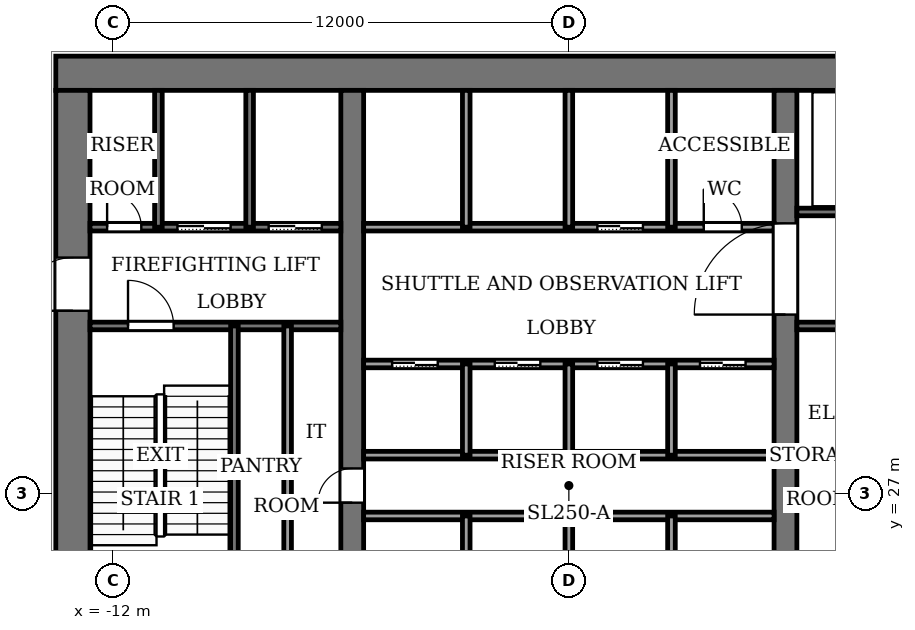
"""IFC4 building model, lengths in metres.
Left out: names, types, materials, properties, quantities, classifications, styles, units other than length and angle.
Written with IfcOpenShell. Run it as: python <this file> out.ifc"""

import sys

from ifc_helpers import new_model, si_unit, direction, frame, frame_2d, origin, place, context, subcontext, project, spatial, rectangle, extrude, element, fill, save


model = new_model("IFC4")
c1 = context("Model", 3, precision=1e-05, world=origin(), true_north=direction((0.0, 1.0)))
c2 = subcontext(c1, "Body", "Model", "MODEL_VIEW")
j1 = project(units=[si_unit("LENGTHUNIT", "METRE"), si_unit("PLANEANGLEUNIT", "RADIAN")], contexts=[c1])
p1 = place(None, origin())
s1 = spatial("IfcSite", under=j1, at=p1, CompositionType="ELEMENT")
p2 = place(p1, origin())
s2 = spatial("IfcBuilding", under=s1, at=p2, CompositionType="ELEMENT")
p3 = place(p2, frame((0.0, 0.0, 177.0)))
s3 = spatial("IfcBuildingStorey", under=s2, at=p3, CompositionType="ELEMENT", Elevation=177.0)
p4 = place(p3, frame((-13.5, 38.05, -0.13), z_axis=(0.0, 0.0, 1.0), x_axis=(1.0, 0.0, 0.0)))
e1 = element("IfcWall", 1, at=p4, inside=s3, PredefinedType="SHEAR", context=c2, shape_type="SweptSolid", body=[
    extrude(rectangle(XDim=27.0, YDim=0.9, at=frame_2d((13.5, 0.0))), origin(), (0.0, 0.0, 1.0), 5.0),
])
p5 = place(p3, frame((-13.05, 18.4, -0.13), z_axis=(0.0, 0.0, 1.0), x_axis=(0.0, 1.0, 0.0)))
e2 = element("IfcWall", 2, at=p5, inside=s3, PredefinedType="SHEAR", context=c2, shape_type="SweptSolid", body=[
    extrude(rectangle(XDim=19.2, YDim=0.9, at=frame_2d((9.6, 0.0))), origin(), (0.0, 0.0, 1.0), 5.0),
])
p6 = place(p5, frame((2.8, 0.0, 0.13)))
e3 = element("IfcOpeningElement", 3, at=p6, cuts=e2, PredefinedType="OPENING", context=c2, shape_type="SweptSolid", body=[
    extrude(rectangle(XDim=2.4, YDim=2.4, at=frame_2d((1.2, 1.2))), frame((0.0, 0.46, 0.0), z_axis=(0.0, -1.0, 0.0), x_axis=(1.0, 0.0, 0.0)), (0.0, 0.0, 1.0), 0.92),
])
p7 = place(p5, frame((13.4, 0.0, 0.13)))
e4 = element("IfcOpeningElement", 4, at=p7, cuts=e2, PredefinedType="OPENING", context=c2, shape_type="SweptSolid", body=[
    extrude(rectangle(XDim=1.4, YDim=2.2, at=frame_2d((0.7, 1.1))), frame((0.0, 0.46, 0.0), z_axis=(0.0, -1.0, 0.0), x_axis=(1.0, 0.0, 0.0)), (0.0, 0.0, 1.0), 0.92),
])
p8 = place(p3, frame((-5.7, 18.4, -0.13), z_axis=(0.0, 0.0, 1.0), x_axis=(0.0, 1.0, 0.0)))
e5 = element("IfcWall", 5, at=p8, inside=s3, PredefinedType="SHEAR", context=c2, shape_type="SweptSolid", body=[
    extrude(rectangle(XDim=19.2, YDim=0.6, at=frame_2d((9.6, 0.0))), origin(), (0.0, 0.0, 1.0), 5.0),
])
p9 = place(p8, frame((8.35, 0.0, 0.13)))
e6 = element("IfcOpeningElement", 6, at=p9, cuts=e5, PredefinedType="OPENING", context=c2, shape_type="SweptSolid", body=[
    extrude(rectangle(XDim=0.9, YDim=2.1, at=frame_2d((0.45, 1.05))), frame((0.0, 0.31, 0.0), z_axis=(0.0, -1.0, 0.0), x_axis=(1.0, 0.0, 0.0)), (0.0, 0.0, 1.0), 0.62),
])
p10 = place(p3, frame((5.7, 18.4, -0.13), z_axis=(0.0, 0.0, 1.0), x_axis=(0.0, 1.0, 0.0)))
e7 = element("IfcWall", 7, at=p10, inside=s3, PredefinedType="SHEAR", context=c2, shape_type="SweptSolid", body=[
    extrude(rectangle(XDim=19.2, YDim=0.6, at=frame_2d((9.6, 0.0))), origin(), (0.0, 0.0, 1.0), 5.0),
])
p11 = place(p10, frame((13.3, 0.0, 0.13)))
e8 = element("IfcOpeningElement", 8, at=p11, cuts=e7, PredefinedType="OPENING", context=c2, shape_type="SweptSolid", body=[
    extrude(rectangle(XDim=2.4, YDim=2.4, at=frame_2d((1.2, 1.2))), frame((0.0, 0.31, 0.0), z_axis=(0.0, -1.0, 0.0), x_axis=(1.0, 0.0, 0.0)), (0.0, 0.0, 1.0), 0.62),
])
for number, where, z_axis, x_axis in (
    (9, (-5.4, 26.4, 0.0), (0.0, 0.0, 1.0), (1.0, 0.0, 0.0)),
    (10, (-5.4, 28.0, 0.0), (0.0, 0.0, 1.0), (1.0, 0.0, 0.0)),
):
    element("IfcWall", number, at=place(p3, frame(where, z_axis=z_axis, x_axis=x_axis)), inside=s3, PredefinedType="PARTITIONING", context=c2, shape_type="SweptSolid", body=[
        extrude(rectangle(XDim=10.8, YDim=0.2, at=frame_2d((5.4, 0.0))), origin(), (0.0, 0.0, 1.0), 4.87),
    ])
p12 = place(p3, frame((-5.4, 30.4, 0.0), z_axis=(0.0, 0.0, 1.0), x_axis=(1.0, 0.0, 0.0)))
e11 = element("IfcWall", 11, at=p12, inside=s3, PredefinedType="PARTITIONING", context=c2, shape_type="SweptSolid", body=[
    extrude(rectangle(XDim=10.8, YDim=0.2, at=frame_2d((5.4, 0.0))), origin(), (0.0, 0.0, 1.0), 4.87),
])
p13 = place(p12, frame((0.75, 0.0, 0.0)))
e12 = element("IfcOpeningElement", 12, at=p13, cuts=e11, PredefinedType="OPENING", context=c2, shape_type="SweptSolid", body=[
    extrude(rectangle(XDim=1.2, YDim=2.2, at=frame_2d((0.6, 1.1))), frame((0.0, 0.11, 0.0), z_axis=(0.0, -1.0, 0.0), x_axis=(1.0, 0.0, 0.0)), (0.0, 0.0, 1.0), 0.22),
])
p14 = place(p12, frame((3.45, 0.0, 0.0)))
e13 = element("IfcOpeningElement", 13, at=p14, cuts=e11, PredefinedType="OPENING", context=c2, shape_type="SweptSolid", body=[
    extrude(rectangle(XDim=1.2, YDim=2.2, at=frame_2d((0.6, 1.1))), frame((0.0, 0.11, 0.0), z_axis=(0.0, -1.0, 0.0), x_axis=(1.0, 0.0, 0.0)), (0.0, 0.0, 1.0), 0.22),
])
p15 = place(p12, frame((6.15, 0.0, 0.0)))
e14 = element("IfcOpeningElement", 14, at=p15, cuts=e11, PredefinedType="OPENING", context=c2, shape_type="SweptSolid", body=[
    extrude(rectangle(XDim=1.2, YDim=2.2, at=frame_2d((0.6, 1.1))), frame((0.0, 0.11, 0.0), z_axis=(0.0, -1.0, 0.0), x_axis=(1.0, 0.0, 0.0)), (0.0, 0.0, 1.0), 0.22),
])
p16 = place(p12, frame((8.85, 0.0, 0.0)))
e15 = element("IfcOpeningElement", 15, at=p16, cuts=e11, PredefinedType="OPENING", context=c2, shape_type="SweptSolid", body=[
    extrude(rectangle(XDim=1.2, YDim=2.2, at=frame_2d((0.6, 1.1))), frame((0.0, 0.11, 0.0), z_axis=(0.0, -1.0, 0.0), x_axis=(1.0, 0.0, 0.0)), (0.0, 0.0, 1.0), 0.22),
])
p17 = place(p3, frame((-12.6, 31.4, 0.0), z_axis=(0.0, 0.0, 1.0), x_axis=(1.0, 0.0, 0.0)))
e16 = element("IfcWall", 16, at=p17, inside=s3, PredefinedType="PARTITIONING", context=c2, shape_type="SweptSolid", body=[
    extrude(rectangle(XDim=6.6, YDim=0.2, at=frame_2d((3.3, 0.0))), origin(), (0.0, 0.0, 1.0), 4.87),
])
p18 = place(p17, frame((1.0, 0.0, 0.0)))
e17 = element("IfcOpeningElement", 17, at=p18, cuts=e16, PredefinedType="OPENING", context=c2, shape_type="SweptSolid", body=[
    extrude(rectangle(XDim=1.2, YDim=2.2, at=frame_2d((0.6, 1.1))), frame((0.0, 0.11, 0.0), z_axis=(0.0, -1.0, 0.0), x_axis=(1.0, 0.0, 0.0)), (0.0, 0.0, 1.0), 0.22),
])
p19 = place(p3, frame((6.0, 31.4, 0.0), z_axis=(0.0, 0.0, 1.0), x_axis=(1.0, 0.0, 0.0)))
e18 = element("IfcWall", 18, at=p19, inside=s3, PredefinedType="PARTITIONING", context=c2, shape_type="SweptSolid", body=[
    extrude(rectangle(XDim=6.6, YDim=0.2, at=frame_2d((3.3, 0.0))), origin(), (0.0, 0.0, 1.0), 4.87),
])
p20 = place(p3, frame((-12.6, 34.0, 0.0), z_axis=(0.0, 0.0, 1.0), x_axis=(1.0, 0.0, 0.0)))
e19 = element("IfcWall", 19, at=p20, inside=s3, PredefinedType="PARTITIONING", context=c2, shape_type="SweptSolid", body=[
    extrude(rectangle(XDim=6.6, YDim=0.2, at=frame_2d((3.3, 0.0))), origin(), (0.0, 0.0, 1.0), 4.87),
])
p21 = place(p20, frame((4.7, 0.0, 0.0)))
e20 = element("IfcOpeningElement", 20, at=p21, cuts=e19, PredefinedType="OPENING", context=c2, shape_type="SweptSolid", body=[
    extrude(rectangle(XDim=1.4, YDim=2.2, at=frame_2d((0.7, 1.1))), frame((0.0, 0.11, 0.0), z_axis=(0.0, -1.0, 0.0), x_axis=(1.0, 0.0, 0.0)), (0.0, 0.0, 1.0), 0.22),
])
p22 = place(p20, frame((2.3, 0.0, 0.0)))
e21 = element("IfcOpeningElement", 21, at=p22, cuts=e19, PredefinedType="OPENING", context=c2, shape_type="SweptSolid", body=[
    extrude(rectangle(XDim=1.4, YDim=2.2, at=frame_2d((0.7, 1.1))), frame((0.0, 0.11, 0.0), z_axis=(0.0, -1.0, 0.0), x_axis=(1.0, 0.0, 0.0)), (0.0, 0.0, 1.0), 0.22),
])
p23 = place(p20, frame((0.45, 0.0, 0.0)))
e22 = element("IfcOpeningElement", 22, at=p23, cuts=e19, PredefinedType="OPENING", context=c2, shape_type="SweptSolid", body=[
    extrude(rectangle(XDim=0.9, YDim=2.1, at=frame_2d((0.45, 1.05))), frame((0.0, 0.11, 0.0), z_axis=(0.0, -1.0, 0.0), x_axis=(1.0, 0.0, 0.0)), (0.0, 0.0, 1.0), 0.22),
])
p24 = place(p3, frame((-5.4, 34.0, 0.0), z_axis=(0.0, 0.0, 1.0), x_axis=(1.0, 0.0, 0.0)))
e23 = element("IfcWall", 23, at=p24, inside=s3, PredefinedType="PARTITIONING", context=c2, shape_type="SweptSolid", body=[
    extrude(rectangle(XDim=10.8, YDim=0.2, at=frame_2d((5.4, 0.0))), origin(), (0.0, 0.0, 1.0), 4.87),
])
p25 = place(p24, frame((6.15, 0.0, 0.0)))
e24 = element("IfcOpeningElement", 24, at=p25, cuts=e23, PredefinedType="OPENING", context=c2, shape_type="SweptSolid", body=[
    extrude(rectangle(XDim=1.2, YDim=2.2, at=frame_2d((0.6, 1.1))), frame((0.0, 0.11, 0.0), z_axis=(0.0, -1.0, 0.0), x_axis=(1.0, 0.0, 0.0)), (0.0, 0.0, 1.0), 0.22),
])
p26 = place(p24, frame((8.95, 0.0, 0.0)))
e25 = element("IfcOpeningElement", 25, at=p26, cuts=e23, PredefinedType="OPENING", context=c2, shape_type="SweptSolid", body=[
    extrude(rectangle(XDim=1.0, YDim=2.1, at=frame_2d((0.5, 1.05))), frame((0.0, 0.11, 0.0), z_axis=(0.0, -1.0, 0.0), x_axis=(1.0, 0.0, 0.0)), (0.0, 0.0, 1.0), 0.22),
])
p27 = place(p3, frame((6.0, 34.4, 0.0), z_axis=(0.0, 0.0, 1.0), x_axis=(1.0, 0.0, 0.0)))
e26 = element("IfcWall", 26, at=p27, inside=s3, PredefinedType="PARTITIONING", context=c2, shape_type="SweptSolid", body=[
    extrude(rectangle(XDim=6.6, YDim=0.2, at=frame_2d((3.3, 0.0))), origin(), (0.0, 0.0, 1.0), 4.87),
])
p28 = place(p27, frame((4.8, 0.0, 0.0)))
e27 = element("IfcOpeningElement", 27, at=p28, cuts=e26, PredefinedType="OPENING", context=c2, shape_type="SweptSolid", body=[
    extrude(rectangle(XDim=1.2, YDim=2.2, at=frame_2d((0.6, 1.1))), frame((0.0, 0.11, 0.0), z_axis=(0.0, -1.0, 0.0), x_axis=(1.0, 0.0, 0.0)), (0.0, 0.0, 1.0), 0.22),
])
p29 = place(p3, frame((-10.8, 34.0, 0.0), z_axis=(0.0, 0.0, 1.0), x_axis=(0.0, 1.0, 0.0)))
e28 = element("IfcWall", 28, at=p29, inside=s3, PredefinedType="PARTITIONING", context=c2, shape_type="SweptSolid", body=[
    extrude(rectangle(XDim=3.6, YDim=0.2, at=frame_2d((1.8, 0.0))), origin(), (0.0, 0.0, 1.0), 4.87),
])
p30 = place(p3, frame((-8.8, 24.0, 0.0), z_axis=(0.0, 0.0, 1.0), x_axis=(0.0, 1.0, 0.0)))
e29 = element("IfcWall", 29, at=p30, inside=s3, PredefinedType="PARTITIONING", context=c2, shape_type="SweptSolid", body=[
    extrude(rectangle(XDim=7.4, YDim=0.2, at=frame_2d((3.7, 0.0))), origin(), (0.0, 0.0, 1.0), 4.87),
])
p31 = place(p3, frame((-8.4, 34.0, 0.0), z_axis=(0.0, 0.0, 1.0), x_axis=(0.0, 1.0, 0.0)))
e30 = element("IfcWall", 30, at=p31, inside=s3, PredefinedType="PARTITIONING", context=c2, shape_type="SweptSolid", body=[
    extrude(rectangle(XDim=3.6, YDim=0.2, at=frame_2d((1.8, 0.0))), origin(), (0.0, 0.0, 1.0), 4.87),
])
p32 = place(p3, frame((-7.4, 24.0, 0.0), z_axis=(0.0, 0.0, 1.0), x_axis=(0.0, 1.0, 0.0)))
e31 = element("IfcWall", 31, at=p32, inside=s3, PredefinedType="PARTITIONING", context=c2, shape_type="SweptSolid", body=[
    extrude(rectangle(XDim=7.4, YDim=0.2, at=frame_2d((3.7, 0.0))), origin(), (0.0, 0.0, 1.0), 4.87),
])
for number, where, z_axis, x_axis in (
    (32, (-2.7, 24.0, 0.0), (0.0, 0.0, 1.0), (0.0, 1.0, 0.0)),
    (33, (-2.7, 28.0, 0.0), (0.0, 0.0, 1.0), (0.0, 1.0, 0.0)),
):
    element("IfcWall", number, at=place(p3, frame(where, z_axis=z_axis, x_axis=x_axis)), inside=s3, PredefinedType="PARTITIONING", context=c2, shape_type="SweptSolid", body=[
        extrude(rectangle(XDim=2.4, YDim=0.2, at=frame_2d((1.2, 0.0))), origin(), (0.0, 0.0, 1.0), 4.87),
    ])
p33 = place(p3, frame((-2.7, 34.0, 0.0), z_axis=(0.0, 0.0, 1.0), x_axis=(0.0, 1.0, 0.0)))
e34 = element("IfcWall", 34, at=p33, inside=s3, PredefinedType="PARTITIONING", context=c2, shape_type="SweptSolid", body=[
    extrude(rectangle(XDim=3.6, YDim=0.2, at=frame_2d((1.8, 0.0))), origin(), (0.0, 0.0, 1.0), 4.87),
])
for number, where, z_axis, x_axis in (
    (35, (0.0, 24.0, 0.0), (0.0, 0.0, 1.0), (0.0, 1.0, 0.0)),
    (36, (0.0, 28.0, 0.0), (0.0, 0.0, 1.0), (0.0, 1.0, 0.0)),
):
    element("IfcWall", number, at=place(p3, frame(where, z_axis=z_axis, x_axis=x_axis)), inside=s3, PredefinedType="PARTITIONING", context=c2, shape_type="SweptSolid", body=[
        extrude(rectangle(XDim=2.4, YDim=0.2, at=frame_2d((1.2, 0.0))), origin(), (0.0, 0.0, 1.0), 4.87),
    ])
p34 = place(p3, frame((0.0, 34.0, 0.0), z_axis=(0.0, 0.0, 1.0), x_axis=(0.0, 1.0, 0.0)))
e37 = element("IfcWall", 37, at=p34, inside=s3, PredefinedType="PARTITIONING", context=c2, shape_type="SweptSolid", body=[
    extrude(rectangle(XDim=3.6, YDim=0.2, at=frame_2d((1.8, 0.0))), origin(), (0.0, 0.0, 1.0), 4.87),
])
for number, where, z_axis, x_axis in (
    (38, (2.7, 24.0, 0.0), (0.0, 0.0, 1.0), (0.0, 1.0, 0.0)),
    (39, (2.7, 28.0, 0.0), (0.0, 0.0, 1.0), (0.0, 1.0, 0.0)),
):
    element("IfcWall", number, at=place(p3, frame(where, z_axis=z_axis, x_axis=x_axis)), inside=s3, PredefinedType="PARTITIONING", context=c2, shape_type="SweptSolid", body=[
        extrude(rectangle(XDim=2.4, YDim=0.2, at=frame_2d((1.2, 0.0))), origin(), (0.0, 0.0, 1.0), 4.87),
    ])
p35 = place(p3, frame((2.7, 34.0, 0.0), z_axis=(0.0, 0.0, 1.0), x_axis=(0.0, 1.0, 0.0)))
e40 = element("IfcWall", 40, at=p35, inside=s3, PredefinedType="PARTITIONING", context=c2, shape_type="SweptSolid", body=[
    extrude(rectangle(XDim=3.6, YDim=0.2, at=frame_2d((1.8, 0.0))), origin(), (0.0, 0.0, 1.0), 4.87),
])
p36 = place(p13, origin())
e41 = element("IfcDoor", 41, at=p36, inside=s3, OperationType="SLIDING_TO_LEFT", PredefinedType="DOOR", context=c2, shape_type="SweptSolid", body=[
    extrude(rectangle(XDim=1.2, YDim=2.2, at=frame_2d((0.6, 1.1))), frame((0.0, 0.025, 0.0), z_axis=(0.0, -1.0, 0.0), x_axis=(1.0, 0.0, 0.0)), (0.0, 0.0, 1.0), 0.05),
])
fill(e12, e41)
p37 = place(p14, origin())
e42 = element("IfcDoor", 42, at=p37, inside=s3, OperationType="SLIDING_TO_LEFT", PredefinedType="DOOR", context=c2, shape_type="SweptSolid", body=[
    extrude(rectangle(XDim=1.2, YDim=2.2, at=frame_2d((0.6, 1.1))), frame((0.0, 0.025, 0.0), z_axis=(0.0, -1.0, 0.0), x_axis=(1.0, 0.0, 0.0)), (0.0, 0.0, 1.0), 0.05),
])
fill(e13, e42)
p38 = place(p15, origin())
e43 = element("IfcDoor", 43, at=p38, inside=s3, OperationType="SLIDING_TO_LEFT", PredefinedType="DOOR", context=c2, shape_type="SweptSolid", body=[
    extrude(rectangle(XDim=1.2, YDim=2.2, at=frame_2d((0.6, 1.1))), frame((0.0, 0.025, 0.0), z_axis=(0.0, -1.0, 0.0), x_axis=(1.0, 0.0, 0.0)), (0.0, 0.0, 1.0), 0.05),
])
fill(e14, e43)
p39 = place(p16, origin())
e44 = element("IfcDoor", 44, at=p39, inside=s3, OperationType="SLIDING_TO_LEFT", PredefinedType="DOOR", context=c2, shape_type="SweptSolid", body=[
    extrude(rectangle(XDim=1.2, YDim=2.2, at=frame_2d((0.6, 1.1))), frame((0.0, 0.025, 0.0), z_axis=(0.0, -1.0, 0.0), x_axis=(1.0, 0.0, 0.0)), (0.0, 0.0, 1.0), 0.05),
])
fill(e15, e44)
p40 = place(p25, origin())
e45 = element("IfcDoor", 45, at=p40, inside=s3, OperationType="SLIDING_TO_LEFT", PredefinedType="DOOR", context=c2, shape_type="SweptSolid", body=[
    extrude(rectangle(XDim=1.2, YDim=2.2, at=frame_2d((0.6, 1.1))), frame((0.0, 0.025, 0.0), z_axis=(0.0, -1.0, 0.0), x_axis=(1.0, 0.0, 0.0)), (0.0, 0.0, 1.0), 0.05),
])
fill(e24, e45)
p41 = place(p21, origin())
e46 = element("IfcDoor", 46, at=p41, inside=s3, OperationType="SLIDING_TO_LEFT", PredefinedType="DOOR", context=c2, shape_type="SweptSolid", body=[
    extrude(rectangle(XDim=1.4, YDim=2.2, at=frame_2d((0.7, 1.1))), frame((0.0, 0.025, 0.0), z_axis=(0.0, -1.0, 0.0), x_axis=(1.0, 0.0, 0.0)), (0.0, 0.0, 1.0), 0.05),
])
fill(e20, e46)
p42 = place(p22, origin())
e47 = element("IfcDoor", 47, at=p42, inside=s3, OperationType="SLIDING_TO_LEFT", PredefinedType="DOOR", context=c2, shape_type="SweptSolid", body=[
    extrude(rectangle(XDim=1.4, YDim=2.2, at=frame_2d((0.7, 1.1))), frame((0.0, 0.025, 0.0), z_axis=(0.0, -1.0, 0.0), x_axis=(1.0, 0.0, 0.0)), (0.0, 0.0, 1.0), 0.05),
])
fill(e21, e47)
p43 = place(p23, origin())
e48 = element("IfcDoor", 48, at=p43, inside=s3, OperationType="SINGLE_SWING_RIGHT", PredefinedType="DOOR", context=c2, shape_type="SweptSolid", body=[
    extrude(rectangle(XDim=0.9, YDim=2.1, at=frame_2d((0.45, 1.05))), frame((0.0, 0.025, 0.0), z_axis=(0.0, -1.0, 0.0), x_axis=(1.0, 0.0, 0.0)), (0.0, 0.0, 1.0), 0.05),
])
fill(e22, e48)
p44 = place(p26, origin())
e49 = element("IfcDoor", 49, at=p44, inside=s3, OperationType="SINGLE_SWING_LEFT", PredefinedType="DOOR", context=c2, shape_type="SweptSolid", body=[
    extrude(rectangle(XDim=1.0, YDim=2.1, at=frame_2d((0.5, 1.05))), frame((0.0, 0.025, 0.0), z_axis=(0.0, -1.0, 0.0), x_axis=(1.0, 0.0, 0.0)), (0.0, 0.0, 1.0), 0.05),
])
fill(e25, e49)
p45 = place(p9, origin())
e50 = element("IfcDoor", 50, at=p45, inside=s3, OperationType="SINGLE_SWING_RIGHT", PredefinedType="DOOR", context=c2, shape_type="SweptSolid", body=[
    extrude(rectangle(XDim=0.9, YDim=2.1, at=frame_2d((0.45, 1.05))), frame((0.0, 0.025, 0.0), z_axis=(0.0, -1.0, 0.0), x_axis=(1.0, 0.0, 0.0)), (0.0, 0.0, 1.0), 0.05),
])
fill(e6, e50)
p46 = place(p18, origin())
e51 = element("IfcDoor", 51, at=p46, inside=s3, OperationType="SINGLE_SWING_RIGHT", PredefinedType="DOOR", context=c2, shape_type="SweptSolid", body=[
    extrude(rectangle(XDim=1.2, YDim=2.2, at=frame_2d((0.6, 1.1))), frame((0.0, 0.025, 0.0), z_axis=(0.0, -1.0, 0.0), x_axis=(1.0, 0.0, 0.0)), (0.0, 0.0, 1.0), 0.05),
])
fill(e17, e51)
p47 = place(p11, origin())
e52 = element("IfcDoor", 52, at=p47, inside=s3, OperationType="DOUBLE_DOOR_SINGLE_SWING", PredefinedType="DOOR", context=c2, shape_type="SweptSolid", body=[
    extrude(rectangle(XDim=2.4, YDim=2.4, at=frame_2d((1.2, 1.2))), frame((0.0, 0.025, 0.0), z_axis=(0.0, -1.0, 0.0), x_axis=(1.0, 0.0, 0.0)), (0.0, 0.0, 1.0), 0.05),
])
fill(e8, e52)
p48 = place(p7, origin())
e53 = element("IfcDoor", 53, at=p48, inside=s3, OperationType="SINGLE_SWING_RIGHT", PredefinedType="DOOR", context=c2, shape_type="SweptSolid", body=[
    extrude(rectangle(XDim=1.4, YDim=2.2, at=frame_2d((0.7, 1.1))), frame((0.0, 0.025, 0.0), z_axis=(0.0, -1.0, 0.0), x_axis=(1.0, 0.0, 0.0)), (0.0, 0.0, 1.0), 0.05),
])
fill(e4, e53)
save(model, sys.argv[1])
